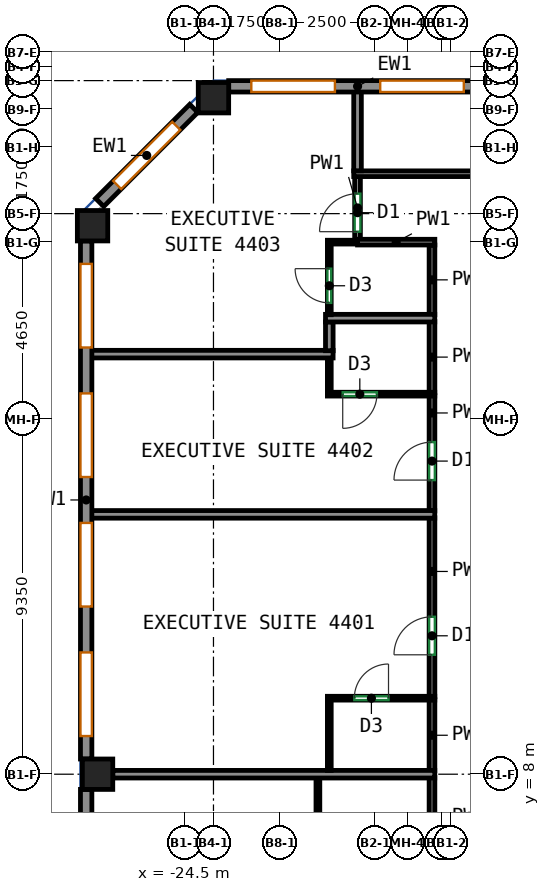
"""IFC4 building model, lengths in metres.
Left out: names, types, materials, properties, quantities, classifications, styles, units other than length and angle.
Written with IfcOpenShell. Run it as: python <this file> out.ifc"""

import sys

from ifc_helpers import new_model, si_unit, direction, frame, frame_2d, origin, origin_2d, place, context, subcontext, project, spatial, rectangle, extrude, source, transform, mapped, element, fill, save


model = new_model("IFC4")
c1 = context("Model", 3, precision=1e-05, world=origin(), true_north=direction((0.0, 1.0)))
c2 = subcontext(c1, "Body", "Model", "MODEL_VIEW")
j1 = project(units=[si_unit("LENGTHUNIT", "METRE"), si_unit("PLANEANGLEUNIT", "RADIAN")], contexts=[c1])
p1 = place(None, origin())
s1 = spatial("IfcSite", under=j1, at=p1, CompositionType="ELEMENT")
p2 = place(p1, origin())
s2 = spatial("IfcBuilding", under=s1, at=p2, CompositionType="ELEMENT")
p3 = place(p2, frame((0.0, 0.0, 185.5)))
s3 = spatial("IfcBuildingStorey", under=s2, at=p3, CompositionType="ELEMENT", Elevation=185.5)
m1 = source(origin(), c2, "Body", "SweptSolid", [
    extrude(rectangle(XDim=0.8, YDim=0.8, at=origin_2d()), origin(), (0.0, 0.0, 1.0), 3.12),
])
for number, where, z_axis, x_axis in (
    (1, (-26.932, 22.432, 0.0), (0.0, 0.0, 1.0), (1.0, 0.0, 0.0)),
    (2, (-26.8, 8.0, 0.0), (0.0, 0.0, 1.0), (1.0, 0.0, 0.0)),
    (3, (-23.75, 25.8, 0.0), (0.0, 0.0, 1.0), (1.0, 0.0, 0.0)),
):
    element("IfcColumn", number, at=place(p3, frame(where, z_axis=z_axis, x_axis=x_axis)), inside=s3, PredefinedType="COLUMN", context=c2, shape_type="MappedRepresentation", body=[
        mapped(m1, transform((0.0, 0.0, 0.0))),
    ])
m2 = source(origin(), c2, "Body", "SweptSolid", [
    extrude(rectangle(XDim=6.783, YDim=0.3, at=frame_2d((3.392, 0.0))), origin(), (0.0, 0.0, 1.0), 3.12),
])
p4 = place(p3, frame((-16.567, 26.1, 0.0), z_axis=(0.0, 0.0, 1.0), x_axis=(-1.0, 0.0, 0.0)))
e4 = element("IfcWall", 4, at=p4, inside=s3, PredefinedType="SOLIDWALL", context=c2, shape_type="MappedRepresentation", body=[
    mapped(m2, transform((0.0, 0.0, 0.0))),
])
p5 = place(p4, frame((0.596, 0.0, 0.85)))
e5 = element("IfcOpeningElement", 5, at=p5, cuts=e4, PredefinedType="OPENING", context=c2, shape_type="SweptSolid", body=[
    extrude(rectangle(XDim=2.2, YDim=1.95, at=frame_2d((1.1, 0.975))), frame((0.0, 0.16, 0.0), z_axis=(0.0, -1.0, 0.0), x_axis=(1.0, 0.0, 0.0)), (0.0, 0.0, 1.0), 0.32),
])
p6 = place(p4, frame((3.988, 0.0, 0.85)))
e6 = element("IfcOpeningElement", 6, at=p6, cuts=e4, PredefinedType="OPENING", context=c2, shape_type="SweptSolid", body=[
    extrude(rectangle(XDim=2.2, YDim=1.95, at=frame_2d((1.1, 0.975))), frame((0.0, 0.16, 0.0), z_axis=(0.0, -1.0, 0.0), x_axis=(1.0, 0.0, 0.0)), (0.0, 0.0, 1.0), 0.32),
])
m3 = source(origin(), c2, "Body", "SweptSolid", [
    extrude(rectangle(XDim=3.5, YDim=0.3, at=frame_2d((1.75, 0.0))), origin(), (0.0, 0.0, 1.0), 3.12),
])
p7 = place(p3, frame((-24.269, 25.519, 0.0), z_axis=(0.0, 0.0, 1.0), x_axis=(-0.707141656123, -0.70707190453, 0.0)))
e7 = element("IfcWall", 7, at=p7, inside=s3, PredefinedType="SOLIDWALL", context=c2, shape_type="MappedRepresentation", body=[
    mapped(m3, transform((0.0, 0.0, 0.0))),
])
p8 = place(p7, frame((0.65, 0.0, 0.85)))
e8 = element("IfcOpeningElement", 8, at=p8, cuts=e7, PredefinedType="OPENING", context=c2, shape_type="SweptSolid", body=[
    extrude(rectangle(XDim=2.2, YDim=1.95, at=frame_2d((1.1, 0.975))), frame((0.0, 0.16, 0.0), z_axis=(0.0, -1.0, 0.0), x_axis=(1.0, 0.0, 0.0)), (0.0, 0.0, 1.0), 0.32),
])
m4 = source(origin(), c2, "Body", "SweptSolid", [
    extrude(rectangle(XDim=13.632, YDim=0.3, at=frame_2d((6.816, 0.0))), origin(), (0.0, 0.0, 1.0), 3.12),
])
p9 = place(p3, frame((-27.1, 22.032, 0.0), z_axis=(0.0, 0.0, 1.0), x_axis=(0.0, -1.0, 0.0)))
e9 = element("IfcWall", 9, at=p9, inside=s3, PredefinedType="SOLIDWALL", context=c2, shape_type="MappedRepresentation", body=[
    mapped(m4, transform((0.0, 0.0, 0.0))),
])
p10 = place(p9, frame((0.604, 0.0, 0.85)))
e10 = element("IfcOpeningElement", 10, at=p10, cuts=e9, PredefinedType="OPENING", context=c2, shape_type="SweptSolid", body=[
    extrude(rectangle(XDim=2.2, YDim=1.95, at=frame_2d((1.1, 0.975))), frame((0.0, 0.16, 0.0), z_axis=(0.0, -1.0, 0.0), x_axis=(1.0, 0.0, 0.0)), (0.0, 0.0, 1.0), 0.32),
])
p11 = place(p9, frame((4.012, 0.0, 0.85)))
e11 = element("IfcOpeningElement", 11, at=p11, cuts=e9, PredefinedType="OPENING", context=c2, shape_type="SweptSolid", body=[
    extrude(rectangle(XDim=2.2, YDim=1.95, at=frame_2d((1.1, 0.975))), frame((0.0, 0.16, 0.0), z_axis=(0.0, -1.0, 0.0), x_axis=(1.0, 0.0, 0.0)), (0.0, 0.0, 1.0), 0.32),
])
p12 = place(p9, frame((7.42, 0.0, 0.85)))
e12 = element("IfcOpeningElement", 12, at=p12, cuts=e9, PredefinedType="OPENING", context=c2, shape_type="SweptSolid", body=[
    extrude(rectangle(XDim=2.2, YDim=1.95, at=frame_2d((1.1, 0.975))), frame((0.0, 0.16, 0.0), z_axis=(0.0, -1.0, 0.0), x_axis=(1.0, 0.0, 0.0)), (0.0, 0.0, 1.0), 0.32),
])
p13 = place(p9, frame((10.828, 0.0, 0.85)))
e13 = element("IfcOpeningElement", 13, at=p13, cuts=e9, PredefinedType="OPENING", context=c2, shape_type="SweptSolid", body=[
    extrude(rectangle(XDim=2.2, YDim=1.95, at=frame_2d((1.1, 0.975))), frame((0.0, 0.16, 0.0), z_axis=(0.0, -1.0, 0.0), x_axis=(1.0, 0.0, 0.0)), (0.0, 0.0, 1.0), 0.32),
])
m5 = source(origin(), c2, "Body", "SweptSolid", [
    extrude(rectangle(XDim=7.763, YDim=0.3, at=frame_2d((3.881, 0.0))), origin(), (0.0, 0.0, 1.0), 3.12),
])
p14 = place(p3, frame((-27.1, 7.6, 0.0), z_axis=(0.0, 0.0, 1.0), x_axis=(0.0, -1.0, 0.0)))
e14 = element("IfcWall", 14, at=p14, inside=s3, PredefinedType="SOLIDWALL", context=c2, shape_type="MappedRepresentation", body=[
    mapped(m5, transform((0.0, 0.0, 0.0))),
])
p15 = place(p14, frame((0.841, 0.0, 0.85)))
e15 = element("IfcOpeningElement", 15, at=p15, cuts=e14, PredefinedType="OPENING", context=c2, shape_type="SweptSolid", body=[
    extrude(rectangle(XDim=2.2, YDim=1.95, at=frame_2d((1.1, 0.975))), frame((0.0, 0.16, 0.0), z_axis=(0.0, -1.0, 0.0), x_axis=(1.0, 0.0, 0.0)), (0.0, 0.0, 1.0), 0.32),
])
p16 = place(p14, frame((4.722, 0.0, 0.85)))
e16 = element("IfcOpeningElement", 16, at=p16, cuts=e14, PredefinedType="OPENING", context=c2, shape_type="SweptSolid", body=[
    extrude(rectangle(XDim=2.2, YDim=1.95, at=frame_2d((1.1, 0.975))), frame((0.0, 0.16, 0.0), z_axis=(0.0, -1.0, 0.0), x_axis=(1.0, 0.0, 0.0)), (0.0, 0.0, 1.0), 0.32),
])
p17 = place(p3, frame((-18.0, 5.84, 0.0), z_axis=(0.0, 0.0, 1.0), x_axis=(0.0, 1.0, 0.0)))
e17 = element("IfcWall", 17, at=p17, inside=s3, PredefinedType="PARTITIONING", context=c2, shape_type="SweptSolid", body=[
    extrude(rectangle(XDim=2.07, YDim=0.15, at=frame_2d((1.035, 0.0))), origin(), (0.0, 0.0, 1.0), 3.12),
])
p18 = place(p3, frame((-18.0, 10.04, 0.0), z_axis=(0.0, 0.0, 1.0), x_axis=(0.0, 1.0, 0.0)))
e18 = element("IfcWall", 18, at=p18, inside=s3, PredefinedType="PARTITIONING", context=c2, shape_type="SweptSolid", body=[
    extrude(rectangle(XDim=4.707, YDim=0.15, at=frame_2d((2.354, 0.0))), origin(), (0.0, 0.0, 1.0), 3.12),
])
p19 = place(p18, frame((1.102, 0.0, 0.0)))
e19 = element("IfcOpeningElement", 19, at=p19, cuts=e18, PredefinedType="OPENING", context=c2, shape_type="SweptSolid", body=[
    extrude(rectangle(XDim=1.0, YDim=2.1, at=frame_2d((0.5, 1.05))), frame((0.0, 0.085, 0.0), z_axis=(0.0, -1.0, 0.0), x_axis=(1.0, 0.0, 0.0)), (0.0, 0.0, 1.0), 0.17),
])
p20 = place(p3, frame((-18.0, 8.09, 0.0), z_axis=(0.0, 0.0, 1.0), x_axis=(0.0, 1.0, 0.0)))
e20 = element("IfcWall", 20, at=p20, inside=s3, PredefinedType="PARTITIONING", context=c2, shape_type="SweptSolid", body=[
    extrude(rectangle(XDim=1.87, YDim=0.15, at=frame_2d((0.935, 0.0))), origin(), (0.0, 0.0, 1.0), 3.12),
])
p21 = place(p3, frame((-18.0, 14.927, 0.0), z_axis=(0.0, 0.0, 1.0), x_axis=(0.0, 1.0, 0.0)))
e21 = element("IfcWall", 21, at=p21, inside=s3, PredefinedType="PARTITIONING", context=c2, shape_type="SweptSolid", body=[
    extrude(rectangle(XDim=3.033, YDim=0.15, at=frame_2d((1.517, 0.0))), origin(), (0.0, 0.0, 1.0), 3.12),
])
p22 = place(p21, frame((0.812, 0.0, 0.0)))
e22 = element("IfcOpeningElement", 22, at=p22, cuts=e21, PredefinedType="OPENING", context=c2, shape_type="SweptSolid", body=[
    extrude(rectangle(XDim=1.0, YDim=2.1, at=frame_2d((0.5, 1.05))), frame((0.0, 0.085, 0.0), z_axis=(0.0, -1.0, 0.0), x_axis=(1.0, 0.0, 0.0)), (0.0, 0.0, 1.0), 0.17),
])
p23 = place(p3, frame((-18.0, 18.04, 0.0), z_axis=(0.0, 0.0, 1.0), x_axis=(0.0, 1.0, 0.0)))
e23 = element("IfcWall", 23, at=p23, inside=s3, PredefinedType="PARTITIONING", context=c2, shape_type="SweptSolid", body=[
    extrude(rectangle(XDim=1.87, YDim=0.15, at=frame_2d((0.935, 0.0))), origin(), (0.0, 0.0, 1.0), 3.12),
])
p24 = place(p3, frame((-19.959, 22.075, 0.0), z_axis=(0.0, 0.0, 1.0), x_axis=(0.0, 1.0, 0.0)))
e24 = element("IfcWall", 24, at=p24, inside=s3, PredefinedType="PARTITIONING", context=c2, shape_type="SweptSolid", body=[
    extrude(rectangle(XDim=1.65, YDim=0.15, at=frame_2d((0.825, 0.0))), origin(), (0.0, 0.0, 1.0), 3.12),
])
p25 = place(p24, frame((0.2, 0.0, 0.0)))
e25 = element("IfcOpeningElement", 25, at=p25, cuts=e24, PredefinedType="OPENING", context=c2, shape_type="SweptSolid", body=[
    extrude(rectangle(XDim=1.0, YDim=2.1, at=frame_2d((0.5, 1.05))), frame((0.0, 0.085, 0.0), z_axis=(0.0, -1.0, 0.0), x_axis=(1.0, 0.0, 0.0)), (0.0, 0.0, 1.0), 0.17),
])
p26 = place(p3, frame((-18.0, 20.09, 0.0), z_axis=(0.0, 0.0, 1.0), x_axis=(0.0, 1.0, 0.0)))
e26 = element("IfcWall", 26, at=p26, inside=s3, PredefinedType="PARTITIONING", context=c2, shape_type="SweptSolid", body=[
    extrude(rectangle(XDim=1.835, YDim=0.15, at=frame_2d((0.917, 0.0))), origin(), (0.0, 0.0, 1.0), 3.12),
])
p27 = place(p3, frame((-19.959, 22.0, 0.0), z_axis=(0.0, 0.0, 1.0), x_axis=(1.0, 0.0, 0.0)))
e27 = element("IfcWall", 27, at=p27, inside=s3, PredefinedType="PARTITIONING", context=c2, shape_type="SweptSolid", body=[
    extrude(rectangle(XDim=2.034, YDim=0.15, at=frame_2d((1.017, 0.0))), origin(), (0.0, 0.0, 1.0), 3.12),
])
p28 = place(p3, frame((21.85, 23.8, 0.0), z_axis=(0.0, 0.0, 1.0), x_axis=(-1.0, 0.0, 0.0)))
e28 = element("IfcWall", 28, at=p28, inside=s3, PredefinedType="PARTITIONING", context=c2, shape_type="SweptSolid", body=[
    extrude(rectangle(XDim=41.909, YDim=0.15, at=frame_2d((20.955, 0.0))), origin(), (0.0, 0.0, 1.0), 3.12),
])
p29 = place(p28, frame((29.607, 0.0, 0.0)))
e29 = element("IfcOpeningElement", 29, at=p29, cuts=e28, PredefinedType="OPENING", context=c2, shape_type="SweptSolid", body=[
    extrude(rectangle(XDim=1.0, YDim=2.1, at=frame_2d((0.5, 1.05))), frame((0.0, 0.085, 0.0), z_axis=(0.0, -1.0, 0.0), x_axis=(1.0, 0.0, 0.0)), (0.0, 0.0, 1.0), 0.17),
])
p30 = place(p3, frame((-21.002, 5.85, 0.0), z_axis=(0.0, 0.0, 1.0), x_axis=(0.0, 1.0, 0.0)))
e30 = element("IfcWall", 30, at=p30, inside=s3, PredefinedType="PARTITIONING", context=c2, shape_type="SweptSolid", body=[
    extrude(rectangle(XDim=2.05, YDim=0.1, at=frame_2d((1.025, 0.0))), origin(), (0.0, 0.0, 1.0), 3.12),
])
p31 = place(p3, frame((-26.4, 8.0, 0.0), z_axis=(0.0, 0.0, 1.0), x_axis=(1.0, 0.0, 0.0)))
e31 = element("IfcWall", 31, at=p31, inside=s3, PredefinedType="PARTITIONING", context=c2, shape_type="SweptSolid", body=[
    extrude(rectangle(XDim=8.473, YDim=0.2, at=frame_2d((4.236, 0.0))), origin(), (0.0, 0.0, 1.0), 3.12),
])
p32 = place(p3, frame((-20.752, 10.0, 0.0), z_axis=(0.0, 0.0, 1.0), x_axis=(1.0, 0.0, 0.0)))
e32 = element("IfcWall", 32, at=p32, inside=s3, PredefinedType="PARTITIONING", context=c2, shape_type="SweptSolid", body=[
    extrude(rectangle(XDim=2.825, YDim=0.1, at=frame_2d((1.413, 0.0))), origin(), (0.0, 0.0, 1.0), 3.12),
])
p33 = place(p32, frame((0.708, 0.0, 0.0)))
e33 = element("IfcOpeningElement", 33, at=p33, cuts=e32, PredefinedType="OPENING", context=c2, shape_type="SweptSolid", body=[
    extrude(rectangle(XDim=0.9, YDim=2.1, at=frame_2d((0.45, 1.05))), frame((0.0, 0.06, 0.0), z_axis=(0.0, -1.0, 0.0), x_axis=(1.0, 0.0, 0.0)), (0.0, 0.0, 1.0), 0.12),
])
p34 = place(p3, frame((-20.702, 8.1, 0.0), z_axis=(0.0, 0.0, 1.0), x_axis=(0.0, 1.0, 0.0)))
e34 = element("IfcWall", 34, at=p34, inside=s3, PredefinedType="PARTITIONING", context=c2, shape_type="SweptSolid", body=[
    extrude(rectangle(XDim=1.85, YDim=0.1, at=frame_2d((0.925, 0.0))), origin(), (0.0, 0.0, 1.0), 3.12),
])
p35 = place(p3, frame((-17.927, 14.837, 0.0), z_axis=(0.0, 0.0, 1.0), x_axis=(-1.0, 0.0, 0.0)))
e35 = element("IfcWall", 35, at=p35, inside=s3, PredefinedType="PARTITIONING", context=c2, shape_type="SweptSolid", body=[
    extrude(rectangle(XDim=9.073, YDim=0.2, at=frame_2d((4.537, 0.0))), origin(), (0.0, 0.0, 1.0), 3.12),
])
p36 = place(p3, frame((-17.927, 18.0, 0.0), z_axis=(0.0, 0.0, 1.0), x_axis=(-1.0, 0.0, 0.0)))
e36 = element("IfcWall", 36, at=p36, inside=s3, PredefinedType="PARTITIONING", context=c2, shape_type="SweptSolid", body=[
    extrude(rectangle(XDim=2.825, YDim=0.1, at=frame_2d((1.413, 0.0))), origin(), (0.0, 0.0, 1.0), 3.12),
])
p37 = place(p36, frame((1.522, 0.0, 0.0)))
e37 = element("IfcOpeningElement", 37, at=p37, cuts=e36, PredefinedType="OPENING", context=c2, shape_type="SweptSolid", body=[
    extrude(rectangle(XDim=0.9, YDim=2.1, at=frame_2d((0.45, 1.05))), frame((0.0, 0.06, 0.0), z_axis=(0.0, -1.0, 0.0), x_axis=(1.0, 0.0, 0.0)), (0.0, 0.0, 1.0), 0.12),
])
p38 = place(p3, frame((-20.702, 18.05, 0.0), z_axis=(0.0, 0.0, 1.0), x_axis=(0.0, 1.0, 0.0)))
e38 = element("IfcWall", 38, at=p38, inside=s3, PredefinedType="PARTITIONING", context=c2, shape_type="SweptSolid", body=[
    extrude(rectangle(XDim=0.903, YDim=0.1, at=frame_2d((0.451, 0.0))), origin(), (0.0, 0.0, 1.0), 3.12),
])
p39 = place(p3, frame((-20.602, 19.053, 0.0), z_axis=(0.0, 0.0, 1.0), x_axis=(-1.0, 0.0, 0.0)))
e39 = element("IfcWall", 39, at=p39, inside=s3, PredefinedType="PARTITIONING", context=c2, shape_type="SweptSolid", body=[
    extrude(rectangle(XDim=6.398, YDim=0.2, at=frame_2d((3.199, 0.0))), origin(), (0.0, 0.0, 1.0), 3.12),
])
p40 = place(p3, frame((-20.702, 19.9, 0.0), z_axis=(0.0, 0.0, 1.0), x_axis=(0.0, -1.0, 0.0)))
e40 = element("IfcWall", 40, at=p40, inside=s3, PredefinedType="PARTITIONING", context=c2, shape_type="SweptSolid", body=[
    extrude(rectangle(XDim=0.757, YDim=0.2, at=frame_2d((0.378, 0.0))), origin(), (0.0, 0.0, 1.0), 3.12),
])
p41 = place(p3, frame((-17.927, 20.0, 0.0), z_axis=(0.0, 0.0, 1.0), x_axis=(-1.0, 0.0, 0.0)))
e41 = element("IfcWall", 41, at=p41, inside=s3, PredefinedType="PARTITIONING", context=c2, shape_type="SweptSolid", body=[
    extrude(rectangle(XDim=2.875, YDim=0.2, at=frame_2d((1.438, 0.0))), origin(), (0.0, 0.0, 1.0), 3.12),
])
p42 = place(p3, frame((-20.752, 22.0, 0.0), z_axis=(0.0, 0.0, 1.0), x_axis=(1.0, 0.0, 0.0)))
e42 = element("IfcWall", 42, at=p42, inside=s3, PredefinedType="PARTITIONING", context=c2, shape_type="SweptSolid", body=[
    extrude(rectangle(XDim=0.791, YDim=0.1, at=frame_2d((0.396, 0.0))), origin(), (0.0, 0.0, 1.0), 3.12),
])
p43 = place(p3, frame((-20.702, 20.09, 0.0), z_axis=(0.0, 0.0, 1.0), x_axis=(0.0, 1.0, 0.0)))
e43 = element("IfcWall", 43, at=p43, inside=s3, PredefinedType="PARTITIONING", context=c2, shape_type="SweptSolid", body=[
    extrude(rectangle(XDim=1.86, YDim=0.1, at=frame_2d((0.93, 0.0))), origin(), (0.0, 0.0, 1.0), 3.12),
])
p44 = place(p43, frame((0.312, 0.0, 0.0)))
e44 = element("IfcOpeningElement", 44, at=p44, cuts=e43, PredefinedType="OPENING", context=c2, shape_type="SweptSolid", body=[
    extrude(rectangle(XDim=0.9, YDim=2.1, at=frame_2d((0.45, 1.05))), frame((0.0, 0.06, 0.0), z_axis=(0.0, -1.0, 0.0), x_axis=(1.0, 0.0, 0.0)), (0.0, 0.0, 1.0), 0.12),
])
p45 = place(p3, frame((-19.959, 23.877, 0.0), z_axis=(0.0, 0.0, 1.0), x_axis=(0.0, 1.0, 0.0)))
e45 = element("IfcWall", 45, at=p45, inside=s3, PredefinedType="PARTITIONING", context=c2, shape_type="SweptSolid", body=[
    extrude(rectangle(XDim=2.123, YDim=0.2, at=frame_2d((1.062, 0.0))), origin(), (0.0, 0.0, 1.0), 3.12),
])
p46 = place(p5, origin())
e46 = element("IfcWindow", 46, at=p46, inside=s3, PartitioningType="SINGLE_PANEL", PredefinedType="WINDOW", context=c2, shape_type="SweptSolid", body=[
    extrude(rectangle(XDim=2.2, YDim=1.95, at=frame_2d((1.1, 0.975))), frame((0.0, 0.03, 0.0), z_axis=(0.0, -1.0, 0.0), x_axis=(1.0, 0.0, 0.0)), (0.0, 0.0, 1.0), 0.06),
])
fill(e5, e46)
p47 = place(p6, origin())
e47 = element("IfcWindow", 47, at=p47, inside=s3, PartitioningType="SINGLE_PANEL", PredefinedType="WINDOW", context=c2, shape_type="SweptSolid", body=[
    extrude(rectangle(XDim=2.2, YDim=1.95, at=frame_2d((1.1, 0.975))), frame((0.0, 0.03, 0.0), z_axis=(0.0, -1.0, 0.0), x_axis=(1.0, 0.0, 0.0)), (0.0, 0.0, 1.0), 0.06),
])
fill(e6, e47)
p48 = place(p8, origin())
e48 = element("IfcWindow", 48, at=p48, inside=s3, PartitioningType="SINGLE_PANEL", PredefinedType="WINDOW", context=c2, shape_type="SweptSolid", body=[
    extrude(rectangle(XDim=2.2, YDim=1.95, at=frame_2d((1.1, 0.975))), frame((0.0, 0.03, 0.0), z_axis=(0.0, -1.0, 0.0), x_axis=(1.0, 0.0, 0.0)), (0.0, 0.0, 1.0), 0.06),
])
fill(e8, e48)
p49 = place(p10, origin())
e49 = element("IfcWindow", 49, at=p49, inside=s3, PartitioningType="SINGLE_PANEL", PredefinedType="WINDOW", context=c2, shape_type="SweptSolid", body=[
    extrude(rectangle(XDim=2.2, YDim=1.95, at=frame_2d((1.1, 0.975))), frame((0.0, 0.03, 0.0), z_axis=(0.0, -1.0, 0.0), x_axis=(1.0, 0.0, 0.0)), (0.0, 0.0, 1.0), 0.06),
])
fill(e10, e49)
p50 = place(p11, origin())
e50 = element("IfcWindow", 50, at=p50, inside=s3, PartitioningType="SINGLE_PANEL", PredefinedType="WINDOW", context=c2, shape_type="SweptSolid", body=[
    extrude(rectangle(XDim=2.2, YDim=1.95, at=frame_2d((1.1, 0.975))), frame((0.0, 0.03, 0.0), z_axis=(0.0, -1.0, 0.0), x_axis=(1.0, 0.0, 0.0)), (0.0, 0.0, 1.0), 0.06),
])
fill(e11, e50)
p51 = place(p12, origin())
e51 = element("IfcWindow", 51, at=p51, inside=s3, PartitioningType="SINGLE_PANEL", PredefinedType="WINDOW", context=c2, shape_type="SweptSolid", body=[
    extrude(rectangle(XDim=2.2, YDim=1.95, at=frame_2d((1.1, 0.975))), frame((0.0, 0.03, 0.0), z_axis=(0.0, -1.0, 0.0), x_axis=(1.0, 0.0, 0.0)), (0.0, 0.0, 1.0), 0.06),
])
fill(e12, e51)
p52 = place(p13, origin())
e52 = element("IfcWindow", 52, at=p52, inside=s3, PartitioningType="SINGLE_PANEL", PredefinedType="WINDOW", context=c2, shape_type="SweptSolid", body=[
    extrude(rectangle(XDim=2.2, YDim=1.95, at=frame_2d((1.1, 0.975))), frame((0.0, 0.03, 0.0), z_axis=(0.0, -1.0, 0.0), x_axis=(1.0, 0.0, 0.0)), (0.0, 0.0, 1.0), 0.06),
])
fill(e13, e52)
p53 = place(p33, origin())
e53 = element("IfcDoor", 53, at=p53, inside=s3, OperationType="SINGLE_SWING_RIGHT", PredefinedType="DOOR", context=c2, shape_type="SweptSolid", body=[
    extrude(rectangle(XDim=0.9, YDim=2.1, at=frame_2d((0.45, 1.05))), frame((0.0, 0.025, 0.0), z_axis=(0.0, -1.0, 0.0), x_axis=(1.0, 0.0, 0.0)), (0.0, 0.0, 1.0), 0.05),
])
fill(e33, e53)
p54 = place(p19, origin())
e54 = element("IfcDoor", 54, at=p54, inside=s3, OperationType="SINGLE_SWING_LEFT", PredefinedType="DOOR", context=c2, shape_type="SweptSolid", body=[
    extrude(rectangle(XDim=1.0, YDim=2.1, at=frame_2d((0.5, 1.05))), frame((0.0, 0.025, 0.0), z_axis=(0.0, -1.0, 0.0), x_axis=(1.0, 0.0, 0.0)), (0.0, 0.0, 1.0), 0.05),
])
fill(e19, e54)
p55 = place(p22, origin())
e55 = element("IfcDoor", 55, at=p55, inside=s3, OperationType="SINGLE_SWING_LEFT", PredefinedType="DOOR", context=c2, shape_type="SweptSolid", body=[
    extrude(rectangle(XDim=1.0, YDim=2.1, at=frame_2d((0.5, 1.05))), frame((0.0, 0.025, 0.0), z_axis=(0.0, -1.0, 0.0), x_axis=(1.0, 0.0, 0.0)), (0.0, 0.0, 1.0), 0.05),
])
fill(e22, e55)
p56 = place(p37, origin())
e56 = element("IfcDoor", 56, at=p56, inside=s3, OperationType="SINGLE_SWING_RIGHT", PredefinedType="DOOR", context=c2, shape_type="SweptSolid", body=[
    extrude(rectangle(XDim=0.9, YDim=2.1, at=frame_2d((0.45, 1.05))), frame((0.0, 0.025, 0.0), z_axis=(0.0, -1.0, 0.0), x_axis=(1.0, 0.0, 0.0)), (0.0, 0.0, 1.0), 0.05),
])
fill(e37, e56)
p57 = place(p44, origin())
e57 = element("IfcDoor", 57, at=p57, inside=s3, OperationType="SINGLE_SWING_RIGHT", PredefinedType="DOOR", context=c2, shape_type="SweptSolid", body=[
    extrude(rectangle(XDim=0.9, YDim=2.1, at=frame_2d((0.45, 1.05))), frame((0.0, 0.025, 0.0), z_axis=(0.0, -1.0, 0.0), x_axis=(1.0, 0.0, 0.0)), (0.0, 0.0, 1.0), 0.05),
])
fill(e44, e57)
p58 = place(p25, origin())
e58 = element("IfcDoor", 58, at=p58, inside=s3, OperationType="SINGLE_SWING_LEFT", PredefinedType="DOOR", context=c2, shape_type="SweptSolid", body=[
    extrude(rectangle(XDim=1.0, YDim=2.1, at=frame_2d((0.5, 1.05))), frame((0.0, 0.025, 0.0), z_axis=(0.0, -1.0, 0.0), x_axis=(1.0, 0.0, 0.0)), (0.0, 0.0, 1.0), 0.05),
])
fill(e25, e58)
save(model, sys.argv[1])
